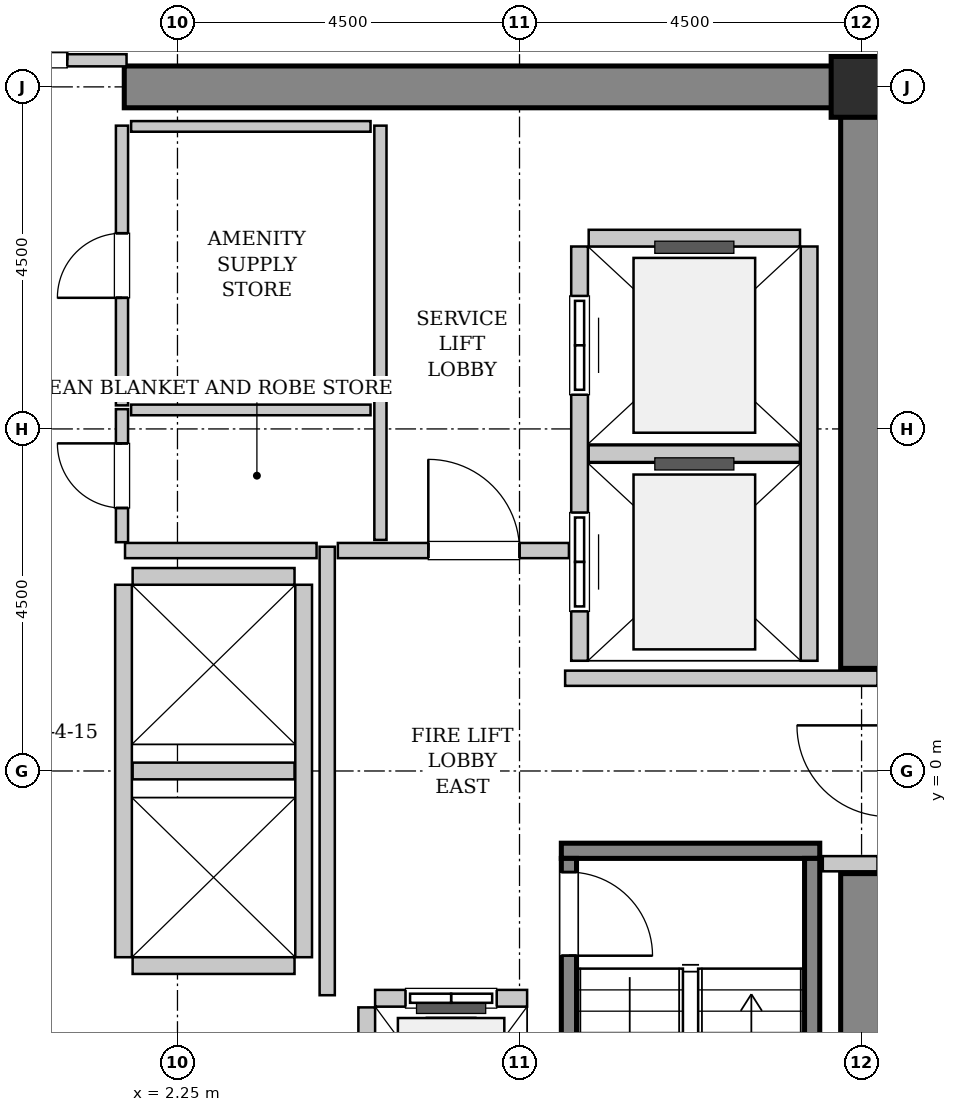
"""IFC4 building model, lengths in metres.
Left out: names, types, materials, properties, quantities, classifications, styles, units other than length and angle.
Written with IfcOpenShell. Run it as: python <this file> out.ifc"""

import sys

from ifc_helpers import new_model, si_unit, direction, frame, frame_2d, origin, origin_2d, place, context, subcontext, project, spatial, rectangle, hollow_rectangle, extrude, source, transform, mapped, element, fill, save


model = new_model("IFC4")
c1 = context("Model", 3, precision=1e-05, world=origin(), true_north=direction((0.0, 1.0)))
c2 = subcontext(c1, "Body", "Model", "MODEL_VIEW")
j1 = project(units=[si_unit("LENGTHUNIT", "METRE"), si_unit("PLANEANGLEUNIT", "RADIAN")], contexts=[c1])
p1 = place(None, origin())
s1 = spatial("IfcSite", under=j1, at=p1, CompositionType="ELEMENT")
p2 = place(p1, origin())
s2 = spatial("IfcBuilding", under=s1, at=p2, CompositionType="ELEMENT")
p3 = place(p2, frame((0.0, 0.0, 198.2)))
s3 = spatial("IfcBuildingStorey", under=s2, at=p3, CompositionType="ELEMENT", Elevation=198.2)
m1 = source(origin(), c2, "Body", "SweptSolid", [
    extrude(rectangle(XDim=9.975, YDim=0.55, at=frame_2d((4.987, 0.0))), origin(), (0.0, 0.0, 1.0), 3.8),
])
p4 = place(p3, frame((1.55, 9.0, 0.0), z_axis=(0.0, 0.0, 1.0), x_axis=(1.0, 0.0, 0.0)))
e1 = element("IfcWall", 1, at=p4, inside=s3, PredefinedType="SHEAR", context=c2, shape_type="MappedRepresentation", body=[
    mapped(m1, transform((0.0, 0.0, 0.0), x_axis=(1.0, 0.0, 0.0), y_axis=(0.0, 1.0, 0.0), z_axis=(0.0, 0.0, 1.0), scale=1.0)),
])
m2 = source(origin(), c2, "Body", "SweptSolid", [
    extrude(rectangle(XDim=7.375, YDim=0.55, at=frame_2d((3.688, 0.0))), origin(), (0.0, 0.0, 1.0), 3.8),
])
for number, where, z_axis, x_axis in (
    (2, (11.25, -8.725, 0.0), (0.0, 0.0, 1.0), (0.0, 1.0, 0.0)),
    (3, (11.25, 1.35, 0.0), (0.0, 0.0, 1.0), (0.0, 1.0, 0.0)),
):
    element("IfcWall", number, at=place(p3, frame(where, z_axis=z_axis, x_axis=x_axis)), inside=s3, PredefinedType="SHEAR", context=c2, shape_type="MappedRepresentation", body=[
        mapped(m2, transform((0.0, 0.0, 0.0), x_axis=(1.0, 0.0, 0.0), y_axis=(0.0, 1.0, 0.0), z_axis=(0.0, 0.0, 1.0), scale=1.0)),
    ])
m3 = source(origin(), c2, "Body", "SweptSolid", [
    extrude(hollow_rectangle(XDim=0.8, YDim=0.8, WallThickness=0.04, InnerFilletRadius=0.04, OuterFilletRadius=0.08, at=origin_2d()), origin(), (0.0, 0.0, 1.0), 3.8),
])
p5 = place(p3, frame((11.25, 9.0, 0.0), z_axis=(0.0, 0.0, 1.0), x_axis=(1.0, 0.0, 0.0)))
e4 = element("IfcColumn", 4, at=p5, inside=s3, PredefinedType="COLUMN", context=c2, shape_type="MappedRepresentation", body=[
    mapped(m3, transform((0.0, 0.0, 0.0), x_axis=(1.0, 0.0, 0.0), y_axis=(0.0, 1.0, 0.0), z_axis=(0.0, 0.0, 1.0), scale=1.0)),
])
m4 = source(origin(), c2, "Body", "SweptSolid", [
    extrude(rectangle(XDim=3.4, YDim=0.2, at=frame_2d((1.7, 0.0))), origin(), (0.0, 0.0, 1.0), 3.8),
])
p6 = place(p3, frame((7.3, -1.05, 0.0), z_axis=(0.0, 0.0, 1.0), x_axis=(1.0, 0.0, 0.0)))
e5 = element("IfcWall", 5, at=p6, inside=s3, PredefinedType="SOLIDWALL", context=c2, shape_type="MappedRepresentation", body=[
    mapped(m4, transform((0.0, 0.0, 0.0), x_axis=(1.0, 0.0, 0.0), y_axis=(0.0, 1.0, 0.0), z_axis=(0.0, 0.0, 1.0), scale=1.0)),
])
m5 = source(origin(), c2, "Body", "SweptSolid", [
    extrude(rectangle(XDim=7.1, YDim=0.2, at=frame_2d((3.55, 0.0))), origin(), (0.0, 0.0, 1.0), 3.8),
])
p7 = place(p3, frame((7.4, -1.15, 0.0), z_axis=(0.0, 0.0, 1.0), x_axis=(0.0, -1.0, 0.0)))
e6 = element("IfcWall", 6, at=p7, inside=s3, PredefinedType="SOLIDWALL", context=c2, shape_type="MappedRepresentation", body=[
    mapped(m5, transform((0.0, 0.0, 0.0), x_axis=(1.0, 0.0, 0.0), y_axis=(0.0, 1.0, 0.0), z_axis=(0.0, 0.0, 1.0), scale=1.0)),
])
p8 = place(p7, frame((0.18, 0.0, 0.0)))
e7 = element("IfcOpeningElement", 7, at=p8, cuts=e6, PredefinedType="OPENING", context=c2, shape_type="SweptSolid", body=[
    extrude(rectangle(XDim=1.1, YDim=2.15, at=frame_2d((0.55, 1.075))), frame((0.0, 0.11, 0.0), z_axis=(0.0, -1.0, 0.0), x_axis=(1.0, 0.0, 0.0)), (0.0, 0.0, 1.0), 0.22),
])
p9 = place(p3, frame((10.6, -1.15, 0.0), z_axis=(0.0, 0.0, 1.0), x_axis=(0.0, -1.0, 0.0)))
e8 = element("IfcWall", 8, at=p9, inside=s3, PredefinedType="SOLIDWALL", context=c2, shape_type="MappedRepresentation", body=[
    mapped(m5, transform((0.0, 0.0, 0.0), x_axis=(1.0, 0.0, 0.0), y_axis=(0.0, 1.0, 0.0), z_axis=(0.0, 0.0, 1.0), scale=1.0)),
])
m6 = source(origin(), c2, "Body", "SweptSolid", [
    extrude(rectangle(XDim=2.0, YDim=0.22, at=frame_2d((1.0, 0.0))), origin(), (0.0, 0.0, 1.0), 3.485),
])
p10 = place(p3, frame((6.85, -2.99, 0.0), z_axis=(0.0, 0.0, 1.0), x_axis=(-1.0, 0.0, 0.0)))
e9 = element("IfcWall", 9, at=p10, inside=s3, PredefinedType="SOLIDWALL", context=c2, shape_type="MappedRepresentation", body=[
    mapped(m6, transform((0.0, 0.0, 0.0), x_axis=(1.0, 0.0, 0.0), y_axis=(0.0, 1.0, 0.0), z_axis=(0.0, 0.0, 1.0), scale=1.0)),
])
p11 = place(p10, frame((0.4, 0.0, 0.0)))
e10 = element("IfcOpeningElement", 10, at=p11, cuts=e9, PredefinedType="OPENING", context=c2, shape_type="SweptSolid", body=[
    extrude(rectangle(XDim=1.2, YDim=2.2, at=frame_2d((0.6, 1.1))), frame((0.0, 0.12, 0.0), z_axis=(0.0, -1.0, 0.0), x_axis=(1.0, 0.0, 0.0)), (0.0, 0.0, 1.0), 0.24),
])
m7 = source(origin(), c2, "Body", "SweptSolid", [
    extrude(rectangle(XDim=2.68, YDim=0.22, at=frame_2d((1.34, 0.0))), origin(), (0.0, 0.0, 1.0), 3.485),
])
p12 = place(p3, frame((4.74, -3.11, 0.0), z_axis=(0.0, 0.0, 1.0), x_axis=(0.0, -1.0, 0.0)))
e11 = element("IfcWall", 11, at=p12, inside=s3, PredefinedType="SOLIDWALL", context=c2, shape_type="MappedRepresentation", body=[
    mapped(m7, transform((0.0, 0.0, 0.0), x_axis=(1.0, 0.0, 0.0), y_axis=(0.0, 1.0, 0.0), z_axis=(0.0, 0.0, 1.0), scale=1.0)),
])
m8 = source(origin(), c2, "Body", "SweptSolid", [
    extrude(rectangle(XDim=5.45, YDim=0.22, at=frame_2d((2.725, 0.0))), origin(), (0.0, 0.0, 1.0), 3.485),
])
p13 = place(p3, frame((7.54, 6.9, 0.0), z_axis=(0.0, 0.0, 1.0), x_axis=(0.0, -1.0, 0.0)))
e12 = element("IfcWall", 12, at=p13, inside=s3, PredefinedType="SOLIDWALL", context=c2, shape_type="MappedRepresentation", body=[
    mapped(m8, transform((0.0, 0.0, 0.0), x_axis=(1.0, 0.0, 0.0), y_axis=(0.0, 1.0, 0.0), z_axis=(0.0, 0.0, 1.0), scale=1.0)),
])
p14 = place(p13, frame((3.5, 0.0, 0.0)))
e13 = element("IfcOpeningElement", 13, at=p14, cuts=e12, PredefinedType="OPENING", context=c2, shape_type="SweptSolid", body=[
    extrude(rectangle(XDim=1.3, YDim=2.3, at=frame_2d((0.65, 1.15))), frame((0.0, 0.12, 0.0), z_axis=(0.0, -1.0, 0.0), x_axis=(1.0, 0.0, 0.0)), (0.0, 0.0, 1.0), 0.24),
])
p15 = place(p13, frame((0.65, 0.0, 0.0)))
e14 = element("IfcOpeningElement", 14, at=p15, cuts=e12, PredefinedType="OPENING", context=c2, shape_type="SweptSolid", body=[
    extrude(rectangle(XDim=1.3, YDim=2.3, at=frame_2d((0.65, 1.15))), frame((0.0, 0.12, 0.0), z_axis=(0.0, -1.0, 0.0), x_axis=(1.0, 0.0, 0.0)), (0.0, 0.0, 1.0), 0.24),
])
p16 = place(p3, frame((10.56, 1.45, 0.0), z_axis=(0.0, 0.0, 1.0), x_axis=(0.0, 1.0, 0.0)))
e15 = element("IfcWall", 15, at=p16, inside=s3, PredefinedType="SOLIDWALL", context=c2, shape_type="MappedRepresentation", body=[
    mapped(m8, transform((0.0, 0.0, 0.0), x_axis=(1.0, 0.0, 0.0), y_axis=(0.0, 1.0, 0.0), z_axis=(0.0, 0.0, 1.0), scale=1.0)),
])
m9 = source(origin(), c2, "Body", "SweptSolid", [
    extrude(rectangle(XDim=2.78, YDim=0.22, at=frame_2d((1.39, 0.0))), origin(), (0.0, 0.0, 1.0), 3.485),
])
for number, where, z_axis, x_axis in (
    (16, (7.66, 4.175, 0.0), (0.0, 0.0, 1.0), (1.0, 0.0, 0.0)),
    (17, (10.44, 7.01, 0.0), (0.0, 0.0, 1.0), (-1.0, 0.0, 0.0)),
):
    element("IfcWall", number, at=place(p3, frame(where, z_axis=z_axis, x_axis=x_axis)), inside=s3, PredefinedType="SOLIDWALL", context=c2, shape_type="MappedRepresentation", body=[
        mapped(m9, transform((0.0, 0.0, 0.0), x_axis=(1.0, 0.0, 0.0), y_axis=(0.0, 1.0, 0.0), z_axis=(0.0, 0.0, 1.0), scale=1.0)),
    ])
m10 = source(origin(), c2, "Body", "SweptSolid", [
    extrude(rectangle(XDim=4.9, YDim=0.22, at=frame_2d((2.45, 0.0))), origin(), (0.0, 0.0, 1.0), 3.485),
])
for number, where, z_axis, x_axis in (
    (18, (1.54, 2.45, 0.0), (0.0, 0.0, 1.0), (0.0, -1.0, 0.0)),
    (19, (3.91, -2.45, 0.0), (0.0, 0.0, 1.0), (0.0, 1.0, 0.0)),
):
    element("IfcWall", number, at=place(p3, frame(where, z_axis=z_axis, x_axis=x_axis)), inside=s3, PredefinedType="SOLIDWALL", context=c2, shape_type="MappedRepresentation", body=[
        mapped(m10, transform((0.0, 0.0, 0.0), x_axis=(1.0, 0.0, 0.0), y_axis=(0.0, 1.0, 0.0), z_axis=(0.0, 0.0, 1.0), scale=1.0)),
    ])
m11 = source(origin(), c2, "Body", "SweptSolid", [
    extrude(rectangle(XDim=2.13, YDim=0.22, at=frame_2d((1.065, 0.0))), origin(), (0.0, 0.0, 1.0), 3.485),
])
for number, where, z_axis, x_axis in (
    (20, (1.66, -2.56, 0.0), (0.0, 0.0, 1.0), (1.0, 0.0, 0.0)),
    (21, (1.66, 0.0, 0.0), (0.0, 0.0, 1.0), (1.0, 0.0, 0.0)),
    (22, (3.79, 2.56, 0.0), (0.0, 0.0, 1.0), (-1.0, 0.0, 0.0)),
):
    element("IfcWall", number, at=place(p3, frame(where, z_axis=z_axis, x_axis=x_axis)), inside=s3, PredefinedType="SOLIDWALL", context=c2, shape_type="MappedRepresentation", body=[
        mapped(m11, transform((0.0, 0.0, 0.0), x_axis=(1.0, 0.0, 0.0), y_axis=(0.0, 1.0, 0.0), z_axis=(0.0, 0.0, 1.0), scale=1.0)),
    ])
m12 = source(origin(), c2, "Body", "SweptSolid", [
    extrude(rectangle(XDim=5.9, YDim=0.2, at=frame_2d((2.95, 0.0))), origin(), (0.0, 0.0, 1.0), 3.485),
])
p17 = place(p3, frame((4.22, -2.95, 0.0), z_axis=(0.0, 0.0, 1.0), x_axis=(0.0, 1.0, 0.0)))
e23 = element("IfcWall", 23, at=p17, inside=s3, PredefinedType="PARTITIONING", context=c2, shape_type="MappedRepresentation", body=[
    mapped(m12, transform((0.0, 0.0, 0.0), x_axis=(1.0, 0.0, 0.0), y_axis=(0.0, 1.0, 0.0), z_axis=(0.0, 0.0, 1.0), scale=1.0)),
])
m13 = source(origin(), c2, "Body", "SweptSolid", [
    extrude(rectangle(XDim=2.52, YDim=0.2, at=frame_2d((1.26, 0.0))), origin(), (0.0, 0.0, 1.0), 3.485),
])
p18 = place(p3, frame((1.56, 2.9, 0.0), z_axis=(0.0, 0.0, 1.0), x_axis=(1.0, 0.0, 0.0)))
e24 = element("IfcWall", 24, at=p18, inside=s3, PredefinedType="PARTITIONING", context=c2, shape_type="MappedRepresentation", body=[
    mapped(m13, transform((0.0, 0.0, 0.0), x_axis=(1.0, 0.0, 0.0), y_axis=(0.0, 1.0, 0.0), z_axis=(0.0, 0.0, 1.0), scale=1.0)),
])
m14 = source(origin(), c2, "Body", "SweptSolid", [
    extrude(rectangle(XDim=3.04, YDim=0.2, at=frame_2d((1.52, 0.0))), origin(), (0.0, 0.0, 1.0), 3.485),
])
p19 = place(p3, frame((4.36, 2.9, 0.0), z_axis=(0.0, 0.0, 1.0), x_axis=(1.0, 0.0, 0.0)))
e25 = element("IfcWall", 25, at=p19, inside=s3, PredefinedType="PARTITIONING", context=c2, shape_type="MappedRepresentation", body=[
    mapped(m14, transform((0.0, 0.0, 0.0), x_axis=(1.0, 0.0, 0.0), y_axis=(0.0, 1.0, 0.0), z_axis=(0.0, 0.0, 1.0), scale=1.0)),
])
p20 = place(p19, frame((1.19, 0.0, 0.0)))
e26 = element("IfcOpeningElement", 26, at=p20, cuts=e25, PredefinedType="OPENING", context=c2, shape_type="SweptSolid", body=[
    extrude(rectangle(XDim=1.2, YDim=2.15, at=frame_2d((0.6, 1.075))), frame((0.0, 0.11, 0.0), z_axis=(0.0, -1.0, 0.0), x_axis=(1.0, 0.0, 0.0)), (0.0, 0.0, 1.0), 0.22),
])
m15 = source(origin(), c2, "Body", "SweptSolid", [
    extrude(rectangle(XDim=4.11, YDim=0.2, at=frame_2d((2.055, 0.0))), origin(), (0.0, 0.0, 1.0), 3.485),
])
p21 = place(p3, frame((7.35, 1.22, 0.0), z_axis=(0.0, 0.0, 1.0), x_axis=(1.0, 0.0, 0.0)))
e27 = element("IfcWall", 27, at=p21, inside=s3, PredefinedType="PARTITIONING", context=c2, shape_type="MappedRepresentation", body=[
    mapped(m15, transform((0.0, 0.0, 0.0), x_axis=(1.0, 0.0, 0.0), y_axis=(0.0, 1.0, 0.0), z_axis=(0.0, 0.0, 1.0), scale=1.0)),
])
m16 = source(origin(), c2, "Body", "SweptSolid", [
    extrude(rectangle(XDim=0.72, YDim=0.2, at=frame_2d((0.36, 0.0))), origin(), (0.0, 0.0, 1.0), 3.485),
])
p22 = place(p3, frame((10.74, -1.22, 0.0), z_axis=(0.0, 0.0, 1.0), x_axis=(1.0, 0.0, 0.0)))
e28 = element("IfcWall", 28, at=p22, inside=s3, PredefinedType="PARTITIONING", context=c2, shape_type="MappedRepresentation", body=[
    mapped(m16, transform((0.0, 0.0, 0.0), x_axis=(1.0, 0.0, 0.0), y_axis=(0.0, 1.0, 0.0), z_axis=(0.0, 0.0, 1.0), scale=1.0)),
])
m17 = source(origin(), c2, "Body", "SweptSolid", [
    extrude(rectangle(XDim=3.16, YDim=0.16, at=frame_2d((1.58, 0.0))), origin(), (0.0, 0.0, 1.0), 2.375),
])
p23 = place(p3, frame((-1.58, 9.35, 0.0), z_axis=(0.0, 0.0, 1.0), x_axis=(1.0, 0.0, 0.0)))
e29 = element("IfcWall", 29, at=p23, inside=s3, PredefinedType="PARTITIONING", context=c2, shape_type="MappedRepresentation", body=[
    mapped(m17, transform((0.0, 0.0, 0.0), x_axis=(1.0, 0.0, 0.0), y_axis=(0.0, 1.0, 0.0), z_axis=(0.0, 0.0, 1.0), scale=1.0)),
])
p24 = place(p23, frame((0.78, 0.0, 0.0)))
e30 = element("IfcOpeningElement", 30, at=p24, cuts=e29, PredefinedType="OPENING", context=c2, shape_type="SweptSolid", body=[
    extrude(rectangle(XDim=1.6, YDim=2.3, at=frame_2d((0.8, 1.15))), frame((0.0, 0.09, 0.0), z_axis=(0.0, -1.0, 0.0), x_axis=(1.0, 0.0, 0.0)), (0.0, 0.0, 1.0), 0.18),
])
m18 = source(origin(), c2, "Body", "SweptSolid", [
    extrude(rectangle(XDim=5.45, YDim=0.16, at=frame_2d((2.725, 0.0))), origin(), (0.0, 0.0, 1.0), 3.485),
])
p25 = place(p3, frame((4.92, 3.04, 0.0), z_axis=(0.0, 0.0, 1.0), x_axis=(0.0, 1.0, 0.0)))
e31 = element("IfcWall", 31, at=p25, inside=s3, PredefinedType="PARTITIONING", context=c2, shape_type="MappedRepresentation", body=[
    mapped(m18, transform((0.0, 0.0, 0.0), x_axis=(1.0, 0.0, 0.0), y_axis=(0.0, 1.0, 0.0), z_axis=(0.0, 0.0, 1.0), scale=1.0)),
])
m19 = source(origin(), c2, "Body", "SweptSolid", [
    extrude(rectangle(XDim=1.75, YDim=0.16, at=frame_2d((0.875, 0.0))), origin(), (0.0, 0.0, 1.0), 3.485),
])
p26 = place(p3, frame((1.52, 3.01, 0.0), z_axis=(0.0, 0.0, 1.0), x_axis=(0.0, 1.0, 0.0)))
e32 = element("IfcWall", 32, at=p26, inside=s3, PredefinedType="PARTITIONING", context=c2, shape_type="MappedRepresentation", body=[
    mapped(m19, transform((0.0, 0.0, 0.0), x_axis=(1.0, 0.0, 0.0), y_axis=(0.0, 1.0, 0.0), z_axis=(0.0, 0.0, 1.0), scale=1.0)),
])
p27 = place(p26, frame((0.45, 0.0, 0.0)))
e33 = element("IfcOpeningElement", 33, at=p27, cuts=e32, PredefinedType="OPENING", context=c2, shape_type="SweptSolid", body=[
    extrude(rectangle(XDim=0.85, YDim=2.1, at=frame_2d((0.425, 1.05))), frame((0.0, 0.09, 0.0), z_axis=(0.0, -1.0, 0.0), x_axis=(1.0, 0.0, 0.0)), (0.0, 0.0, 1.0), 0.18),
])
m20 = source(origin(), c2, "Body", "SweptSolid", [
    extrude(rectangle(XDim=3.15, YDim=0.14, at=frame_2d((1.575, 0.0))), origin(), (0.0, 0.0, 1.0), 3.485),
])
p28 = place(p3, frame((1.64, 4.75, 0.0), z_axis=(0.0, 0.0, 1.0), x_axis=(1.0, 0.0, 0.0)))
e34 = element("IfcWall", 34, at=p28, inside=s3, PredefinedType="PARTITIONING", context=c2, shape_type="MappedRepresentation", body=[
    mapped(m20, transform((0.0, 0.0, 0.0), x_axis=(1.0, 0.0, 0.0), y_axis=(0.0, 1.0, 0.0), z_axis=(0.0, 0.0, 1.0), scale=1.0)),
])
m21 = source(origin(), c2, "Body", "SweptSolid", [
    extrude(rectangle(XDim=3.68, YDim=0.16, at=frame_2d((1.84, 0.0))), origin(), (0.0, 0.0, 1.0), 3.485),
])
p29 = place(p3, frame((1.52, 4.81, 0.0), z_axis=(0.0, 0.0, 1.0), x_axis=(0.0, 1.0, 0.0)))
e35 = element("IfcWall", 35, at=p29, inside=s3, PredefinedType="PARTITIONING", context=c2, shape_type="MappedRepresentation", body=[
    mapped(m21, transform((0.0, 0.0, 0.0), x_axis=(1.0, 0.0, 0.0), y_axis=(0.0, 1.0, 0.0), z_axis=(0.0, 0.0, 1.0), scale=1.0)),
])
p30 = place(p29, frame((1.415, 0.0, 0.0)))
e36 = element("IfcOpeningElement", 36, at=p30, cuts=e35, PredefinedType="OPENING", context=c2, shape_type="SweptSolid", body=[
    extrude(rectangle(XDim=0.85, YDim=2.1, at=frame_2d((0.425, 1.05))), frame((0.0, 0.09, 0.0), z_axis=(0.0, -1.0, 0.0), x_axis=(1.0, 0.0, 0.0)), (0.0, 0.0, 1.0), 0.18),
])
p31 = place(p3, frame((1.64, 8.48, 0.0), z_axis=(0.0, 0.0, 1.0), x_axis=(1.0, 0.0, 0.0)))
e37 = element("IfcWall", 37, at=p31, inside=s3, PredefinedType="PARTITIONING", context=c2, shape_type="MappedRepresentation", body=[
    mapped(m20, transform((0.0, 0.0, 0.0), x_axis=(1.0, 0.0, 0.0), y_axis=(0.0, 1.0, 0.0), z_axis=(0.0, 0.0, 1.0), scale=1.0)),
])
m22 = source(origin(), c2, "Body", "SweptSolid", [
    extrude(rectangle(XDim=1.1, YDim=2.15, at=frame_2d((0.55, 1.075))), frame((0.0, 0.025, 0.0), z_axis=(0.0, -1.0, 0.0), x_axis=(1.0, 0.0, 0.0)), (0.0, 0.0, 1.0), 0.05),
])
p32 = place(p8, origin())
e38 = element("IfcDoor", 38, at=p32, inside=s3, OperationType="SINGLE_SWING_RIGHT", PredefinedType="DOOR", context=c2, shape_type="MappedRepresentation", body=[
    mapped(m22, transform((0.0, 0.0, 0.0), x_axis=(1.0, 0.0, 0.0), y_axis=(0.0, 1.0, 0.0), z_axis=(0.0, 0.0, 1.0), scale=1.0)),
])
fill(e7, e38)
m23 = source(origin(), c2, "Body", "SweptSolid", [
    extrude(rectangle(XDim=1.2, YDim=2.2, at=frame_2d((0.6, 1.1))), frame((0.0, 0.025, 0.0), z_axis=(0.0, -1.0, 0.0), x_axis=(1.0, 0.0, 0.0)), (0.0, 0.0, 1.0), 0.05),
])
p33 = place(p11, origin())
e39 = element("IfcDoor", 39, at=p33, inside=s3, OperationType="SLIDING_TO_LEFT", PredefinedType="DOOR", context=c2, shape_type="MappedRepresentation", body=[
    mapped(m23, transform((0.0, 0.0, 0.0), x_axis=(1.0, 0.0, 0.0), y_axis=(0.0, 1.0, 0.0), z_axis=(0.0, 0.0, 1.0), scale=1.0)),
])
fill(e10, e39)
m24 = source(origin(), c2, "Body", "SweptSolid", [
    extrude(rectangle(XDim=1.3, YDim=2.3, at=frame_2d((0.65, 1.15))), frame((0.0, 0.025, 0.0), z_axis=(0.0, -1.0, 0.0), x_axis=(1.0, 0.0, 0.0)), (0.0, 0.0, 1.0), 0.05),
])
p34 = place(p14, origin())
e40 = element("IfcDoor", 40, at=p34, inside=s3, OperationType="SLIDING_TO_RIGHT", PredefinedType="DOOR", context=c2, shape_type="MappedRepresentation", body=[
    mapped(m24, transform((0.0, 0.0, 0.0), x_axis=(1.0, 0.0, 0.0), y_axis=(0.0, 1.0, 0.0), z_axis=(0.0, 0.0, 1.0), scale=1.0)),
])
fill(e13, e40)
p35 = place(p15, origin())
e41 = element("IfcDoor", 41, at=p35, inside=s3, OperationType="SLIDING_TO_RIGHT", PredefinedType="DOOR", context=c2, shape_type="MappedRepresentation", body=[
    mapped(m24, transform((0.0, 0.0, 0.0), x_axis=(1.0, 0.0, 0.0), y_axis=(0.0, 1.0, 0.0), z_axis=(0.0, 0.0, 1.0), scale=1.0)),
])
fill(e14, e41)
m25 = source(origin(), c2, "Body", "SweptSolid", [
    extrude(rectangle(XDim=1.2, YDim=2.15, at=frame_2d((0.6, 1.075))), frame((0.0, 0.025, 0.0), z_axis=(0.0, -1.0, 0.0), x_axis=(1.0, 0.0, 0.0)), (0.0, 0.0, 1.0), 0.05),
])
p36 = place(p20, origin())
e42 = element("IfcDoor", 42, at=p36, inside=s3, OperationType="SINGLE_SWING_LEFT", PredefinedType="DOOR", context=c2, shape_type="MappedRepresentation", body=[
    mapped(m25, transform((0.0, 0.0, 0.0), x_axis=(1.0, 0.0, 0.0), y_axis=(0.0, 1.0, 0.0), z_axis=(0.0, 0.0, 1.0), scale=1.0)),
])
fill(e26, e42)
m26 = source(origin(), c2, "Body", "SweptSolid", [
    extrude(rectangle(XDim=1.6, YDim=2.3, at=frame_2d((0.8, 1.15))), frame((0.0, 0.025, 0.0), z_axis=(0.0, -1.0, 0.0), x_axis=(1.0, 0.0, 0.0)), (0.0, 0.0, 1.0), 0.05),
])
p37 = place(p24, origin())
e43 = element("IfcDoor", 43, at=p37, inside=s3, OperationType="DOUBLE_DOOR_SINGLE_SWING", PredefinedType="DOOR", context=c2, shape_type="MappedRepresentation", body=[
    mapped(m26, transform((0.0, 0.0, 0.0), x_axis=(1.0, 0.0, 0.0), y_axis=(0.0, 1.0, 0.0), z_axis=(0.0, 0.0, 1.0), scale=1.0)),
])
fill(e30, e43)
m27 = source(origin(), c2, "Body", "SweptSolid", [
    extrude(rectangle(XDim=0.85, YDim=2.1, at=frame_2d((0.425, 1.05))), frame((0.0, 0.025, 0.0), z_axis=(0.0, -1.0, 0.0), x_axis=(1.0, 0.0, 0.0)), (0.0, 0.0, 1.0), 0.05),
])
p38 = place(p27, origin())
e44 = element("IfcDoor", 44, at=p38, inside=s3, OperationType="SINGLE_SWING_RIGHT", PredefinedType="DOOR", context=c2, shape_type="MappedRepresentation", body=[
    mapped(m27, transform((0.0, 0.0, 0.0), x_axis=(1.0, 0.0, 0.0), y_axis=(0.0, 1.0, 0.0), z_axis=(0.0, 0.0, 1.0), scale=1.0)),
])
fill(e33, e44)
p39 = place(p30, origin())
e45 = element("IfcDoor", 45, at=p39, inside=s3, OperationType="SINGLE_SWING_LEFT", PredefinedType="DOOR", context=c2, shape_type="MappedRepresentation", body=[
    mapped(m27, transform((0.0, 0.0, 0.0), x_axis=(1.0, 0.0, 0.0), y_axis=(0.0, 1.0, 0.0), z_axis=(0.0, 0.0, 1.0), scale=1.0)),
])
fill(e36, e45)
save(model, sys.argv[1])
